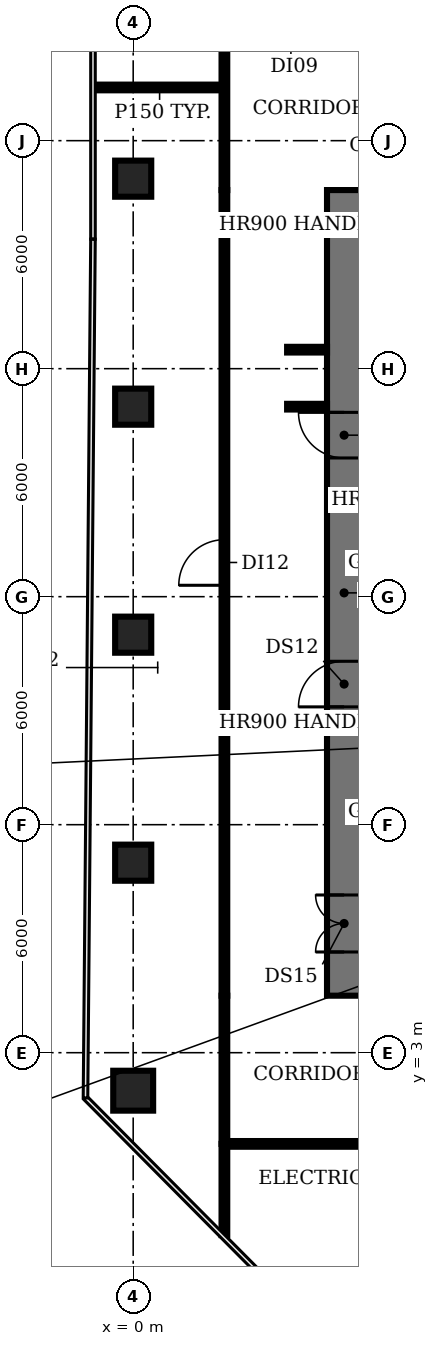
"""IFC4 building model, lengths in metres.
Left out: names, types, materials, properties, quantities, classifications, styles, units other than length and angle.
Written with IfcOpenShell. Run it as: python <this file> out.ifc"""

import sys

from ifc_helpers import new_model, si_unit, direction, frame, frame_2d, origin, origin_2d, place, context, subcontext, project, spatial, rectangle, circle, extrude, element, fill, save


model = new_model("IFC4")
c1 = context("Model", 3, precision=1e-05, world=origin(), true_north=direction((0.0, 1.0)))
c2 = subcontext(c1, "Body", "Model", "MODEL_VIEW")
j1 = project(units=[si_unit("LENGTHUNIT", "METRE"), si_unit("PLANEANGLEUNIT", "RADIAN")], contexts=[c1])
p1 = place(None, origin())
s1 = spatial("IfcSite", under=j1, at=p1, CompositionType="ELEMENT")
p2 = place(p1, origin())
s2 = spatial("IfcBuilding", under=s1, at=p2, CompositionType="ELEMENT")
p3 = place(p2, frame((0.0, 0.0, 50.0)))
s3 = spatial("IfcBuildingStorey", under=s2, at=p3, CompositionType="ELEMENT", Elevation=50.0)
p4 = place(p3, frame((0.0, 2.0, 0.0), z_axis=(0.0, 0.0, 1.0), x_axis=(1.0, 0.0, 0.0)))
e1 = element("IfcColumn", 1, at=p4, inside=s3, PredefinedType="COLUMN", context=c2, shape_type="SweptSolid", body=[
    extrude(circle(Radius=0.525, at=origin_2d()), origin(), (0.0, 0.0, 1.0), 3.85),
])
for number, where, z_axis, x_axis in (
    (2, (0.0, 8.0, 0.0), (0.0, 0.0, 1.0), (1.0, 0.0, 0.0)),
    (3, (0.0, 14.0, 0.0), (0.0, 0.0, 1.0), (1.0, 0.0, 0.0)),
    (4, (0.0, 20.0, 0.0), (0.0, 0.0, 1.0), (1.0, 0.0, 0.0)),
    (5, (0.0, 26.0, 0.0), (0.0, 0.0, 1.0), (1.0, 0.0, 0.0)),
):
    element("IfcColumn", number, at=place(p3, frame(where, z_axis=z_axis, x_axis=x_axis)), inside=s3, PredefinedType="COLUMN", context=c2, shape_type="SweptSolid", body=[
        extrude(rectangle(XDim=0.95, YDim=0.95, at=origin_2d()), origin(), (0.0, 0.0, 1.0), 3.85),
    ])
p5 = place(p3, frame((5.55, 4.5, 0.0), z_axis=(0.0, 0.0, 1.0), x_axis=(0.0, 1.0, 0.0)))
e6 = element("IfcWall", 6, at=p5, inside=s3, PredefinedType="SHEAR", context=c2, shape_type="SweptSolid", body=[
    extrude(rectangle(XDim=21.2, YDim=0.9, at=frame_2d((10.6, 0.0))), origin(), (0.0, 0.0, 1.0), 3.85),
])
p6 = place(p5, frame((1.15, 0.0, 0.0)))
e7 = element("IfcOpeningElement", 7, at=p6, cuts=e6, PredefinedType="OPENING", context=c2, shape_type="SweptSolid", body=[
    extrude(rectangle(XDim=1.5, YDim=2.1, at=frame_2d((0.75, 1.05))), frame((0.0, 0.46, 0.0), z_axis=(0.0, -1.0, 0.0), x_axis=(1.0, 0.0, 0.0)), (0.0, 0.0, 1.0), 0.92),
])
p7 = place(p5, frame((7.6, 0.0, 0.0)))
e8 = element("IfcOpeningElement", 8, at=p7, cuts=e6, PredefinedType="OPENING", context=c2, shape_type="SweptSolid", body=[
    extrude(rectangle(XDim=1.2, YDim=2.1, at=frame_2d((0.6, 1.05))), frame((0.0, 0.46, 0.0), z_axis=(0.0, -1.0, 0.0), x_axis=(1.0, 0.0, 0.0)), (0.0, 0.0, 1.0), 0.92),
])
p8 = place(p5, frame((14.15, 0.0, 0.0)))
e9 = element("IfcOpeningElement", 9, at=p8, cuts=e6, PredefinedType="OPENING", context=c2, shape_type="SweptSolid", body=[
    extrude(rectangle(XDim=1.2, YDim=2.1, at=frame_2d((0.6, 1.05))), frame((0.0, 0.46, 0.0), z_axis=(0.0, -1.0, 0.0), x_axis=(1.0, 0.0, 0.0)), (0.0, 0.0, 1.0), 0.92),
])
p9 = place(p3, frame((-1.01, 28.4, 0.0), z_axis=(0.0, 0.0, 1.0), x_axis=(1.0, 0.0, 0.0)))
e10 = element("IfcWall", 10, at=p9, inside=s3, PredefinedType="PARTITIONING", context=c2, shape_type="SweptSolid", body=[
    extrude(rectangle(XDim=3.41, YDim=0.15, at=frame_2d((1.705, 0.0))), origin(), (0.0, 0.0, 1.0), 2.83),
])
p10 = place(p3, frame((2.4, -1.8, 0.0), z_axis=(0.0, 0.0, 1.0), x_axis=(0.0, 1.0, 0.0)))
e11 = element("IfcWall", 11, at=p10, inside=s3, PredefinedType="PARTITIONING", context=c2, shape_type="SweptSolid", body=[
    extrude(rectangle(XDim=2.4, YDim=0.15, at=frame_2d((1.2, 0.0))), origin(), (0.0, 0.0, 1.0), 2.83),
])
p11 = place(p3, frame((2.4, 0.6, 0.0), z_axis=(0.0, 0.0, 1.0), x_axis=(0.0, 1.0, 0.0)))
e12 = element("IfcWall", 12, at=p11, inside=s3, PredefinedType="PARTITIONING", context=c2, shape_type="SweptSolid", body=[
    extrude(rectangle(XDim=3.9, YDim=0.15, at=frame_2d((1.95, 0.0))), origin(), (0.0, 0.0, 1.0), 2.83),
])
p12 = place(p3, frame((2.4, 4.5, 0.0), z_axis=(0.0, 0.0, 1.0), x_axis=(0.0, 1.0, 0.0)))
e13 = element("IfcWall", 13, at=p12, inside=s3, PredefinedType="PARTITIONING", context=c2, shape_type="SweptSolid", body=[
    extrude(rectangle(XDim=21.2, YDim=0.15, at=frame_2d((10.6, 0.0))), origin(), (0.0, 0.0, 1.0), 2.83),
])
p13 = place(p12, frame((10.8, 0.0, 0.0)))
e14 = element("IfcOpeningElement", 14, at=p13, cuts=e13, PredefinedType="OPENING", context=c2, shape_type="SweptSolid", body=[
    extrude(rectangle(XDim=1.2, YDim=2.1, at=frame_2d((0.6, 1.05))), frame((0.0, 0.085, 0.0), z_axis=(0.0, -1.0, 0.0), x_axis=(1.0, 0.0, 0.0)), (0.0, 0.0, 1.0), 0.17),
])
p14 = place(p3, frame((2.4, 25.7, 0.0), z_axis=(0.0, 0.0, 1.0), x_axis=(0.0, 1.0, 0.0)))
e15 = element("IfcWall", 15, at=p14, inside=s3, PredefinedType="PARTITIONING", context=c2, shape_type="SweptSolid", body=[
    extrude(rectangle(XDim=3.9, YDim=0.15, at=frame_2d((1.95, 0.0))), origin(), (0.0, 0.0, 1.0), 2.83),
])
for number, where, z_axis, x_axis in (
    (16, (4.05, 20.0, 0.0), (0.0, 0.0, 1.0), (1.0, 0.0, 0.0)),
    (17, (4.05, 21.5, 0.0), (0.0, 0.0, 1.0), (1.0, 0.0, 0.0)),
):
    element("IfcWall", number, at=place(p3, frame(where, z_axis=z_axis, x_axis=x_axis)), inside=s3, PredefinedType="PARTITIONING", context=c2, shape_type="SweptSolid", body=[
        extrude(rectangle(XDim=1.05, YDim=0.15, at=frame_2d((0.525, 0.0))), origin(), (0.0, 0.0, 1.0), 2.83),
    ])
p15 = place(p3, frame((27.6, 0.6, 0.0), z_axis=(0.0, 0.0, 1.0), x_axis=(-1.0, 0.0, 0.0)))
e18 = element("IfcWall", 18, at=p15, inside=s3, PredefinedType="PARTITIONING", context=c2, shape_type="SweptSolid", body=[
    extrude(rectangle(XDim=25.2, YDim=0.15, at=frame_2d((12.6, 0.0))), origin(), (0.0, 0.0, 1.0), 2.83),
])
p16 = place(p15, frame((12.1, 0.0, 0.0)))
e19 = element("IfcOpeningElement", 19, at=p16, cuts=e18, PredefinedType="OPENING", context=c2, shape_type="SweptSolid", body=[
    extrude(rectangle(XDim=1.2, YDim=2.1, at=frame_2d((0.6, 1.05))), frame((0.0, 0.085, 0.0), z_axis=(0.0, -1.0, 0.0), x_axis=(1.0, 0.0, 0.0)), (0.0, 0.0, 1.0), 0.17),
])
p17 = place(p6, origin())
e20 = element("IfcDoor", 20, at=p17, inside=s3, OperationType="DOUBLE_DOOR_SINGLE_SWING", PredefinedType="DOOR", context=c2, shape_type="SweptSolid", body=[
    extrude(rectangle(XDim=1.5, YDim=2.1, at=frame_2d((0.75, 1.05))), frame((0.0, 0.025, 0.0), z_axis=(0.0, -1.0, 0.0), x_axis=(1.0, 0.0, 0.0)), (0.0, 0.0, 1.0), 0.05),
])
fill(e7, e20)
p18 = place(p7, origin())
e21 = element("IfcDoor", 21, at=p18, inside=s3, OperationType="SINGLE_SWING_LEFT", PredefinedType="DOOR", context=c2, shape_type="SweptSolid", body=[
    extrude(rectangle(XDim=1.2, YDim=2.1, at=frame_2d((0.6, 1.05))), frame((0.0, 0.025, 0.0), z_axis=(0.0, -1.0, 0.0), x_axis=(1.0, 0.0, 0.0)), (0.0, 0.0, 1.0), 0.05),
])
fill(e8, e21)
p19 = place(p8, origin())
e22 = element("IfcDoor", 22, at=p19, inside=s3, OperationType="SINGLE_SWING_RIGHT", PredefinedType="DOOR", context=c2, shape_type="SweptSolid", body=[
    extrude(rectangle(XDim=1.2, YDim=2.1, at=frame_2d((0.6, 1.05))), frame((0.0, 0.025, 0.0), z_axis=(0.0, -1.0, 0.0), x_axis=(1.0, 0.0, 0.0)), (0.0, 0.0, 1.0), 0.05),
])
fill(e9, e22)
p20 = place(p13, origin())
e23 = element("IfcDoor", 23, at=p20, inside=s3, OperationType="SINGLE_SWING_LEFT", PredefinedType="DOOR", context=c2, shape_type="SweptSolid", body=[
    extrude(rectangle(XDim=1.2, YDim=2.1, at=frame_2d((0.6, 1.05))), frame((0.0, 0.025, 0.0), z_axis=(0.0, -1.0, 0.0), x_axis=(1.0, 0.0, 0.0)), (0.0, 0.0, 1.0), 0.05),
])
fill(e14, e23)
save(model, sys.argv[1])
